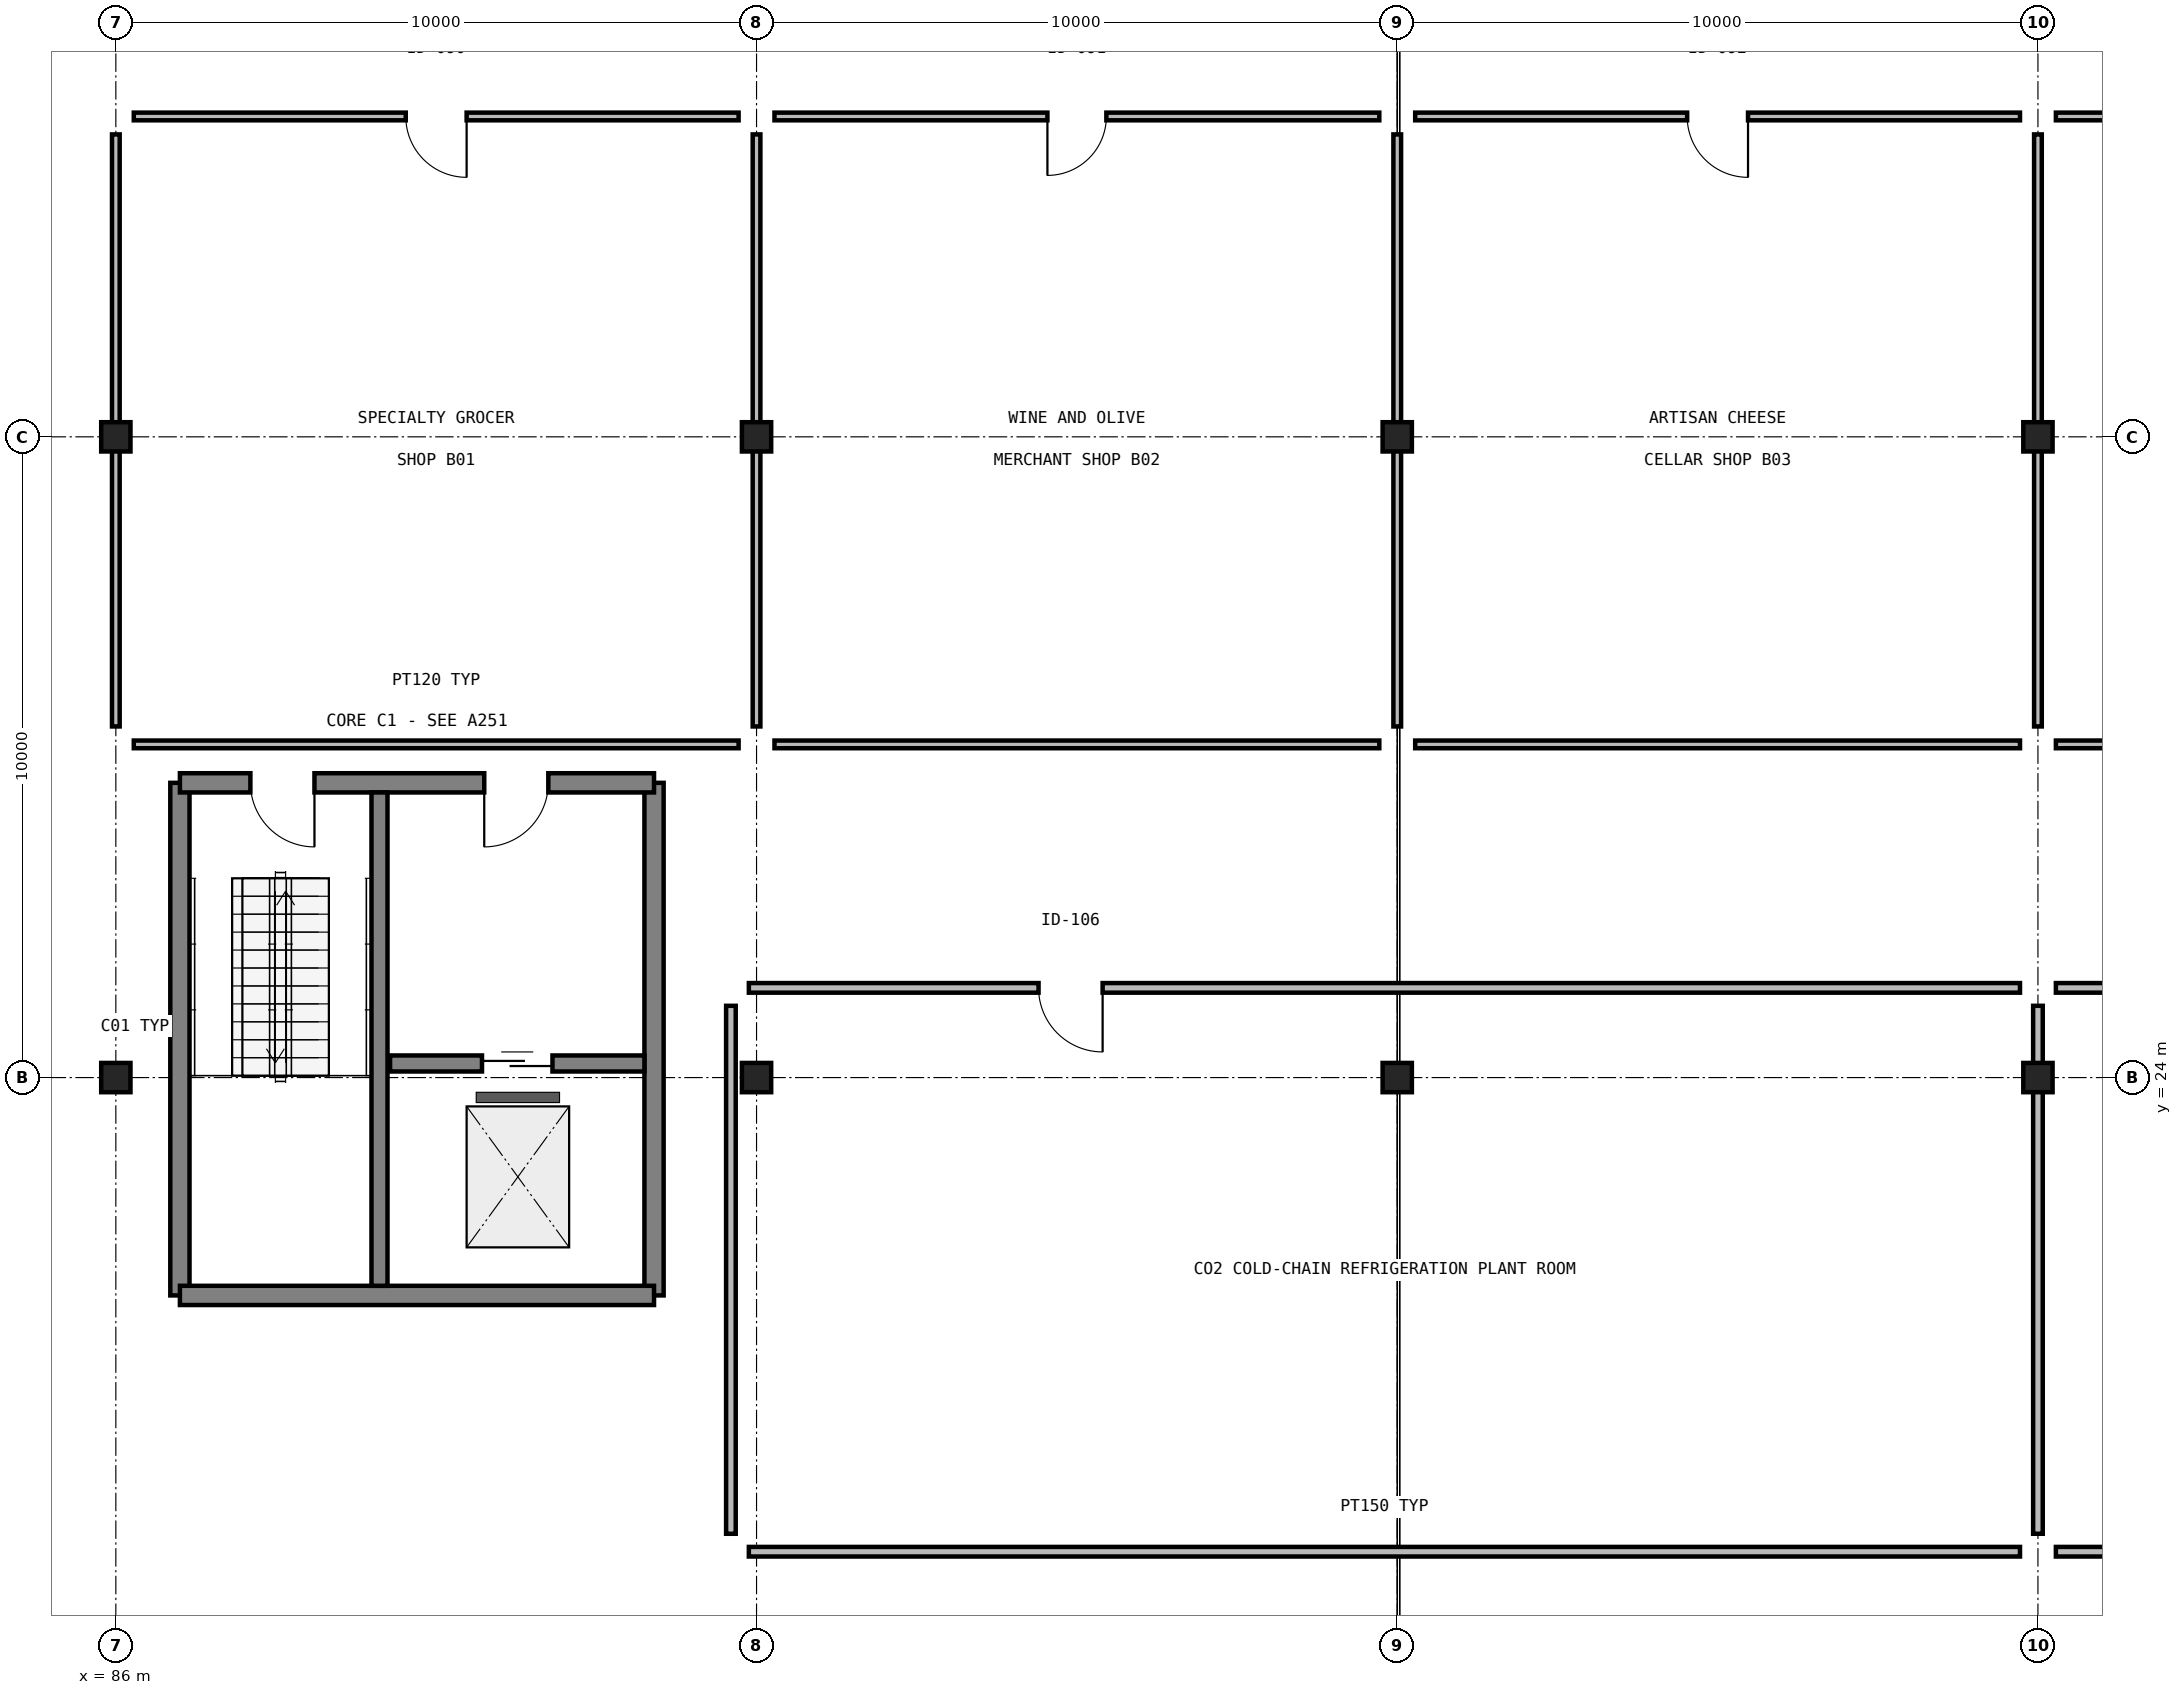
"""IFC4 building model, lengths in metres.
Left out: names, types, materials, properties, quantities, classifications, styles, units other than length and angle.
Written with IfcOpenShell. Run it as: python <this file> out.ifc"""

import sys

from ifc_helpers import new_model, si_unit, direction, frame, frame_2d, origin, origin_2d_with_axis, place, context, subcontext, project, spatial, rectangle, hollow_circle, extrude, element, fill, save


model = new_model("IFC4")
c1 = context("Model", 3, precision=1e-05, world=origin(), true_north=direction((0.0, 1.0)))
c2 = subcontext(c1, "Body", "Model", "MODEL_VIEW")
j1 = project(units=[si_unit("LENGTHUNIT", "METRE"), si_unit("PLANEANGLEUNIT", "RADIAN")], contexts=[c1])
p1 = place(None, origin())
s1 = spatial("IfcSite", under=j1, at=p1, CompositionType="ELEMENT")
p2 = place(p1, origin())
s2 = spatial("IfcBuilding", under=s1, at=p2, CompositionType="ELEMENT")
p3 = place(p2, frame((0.0, 0.0, -4.5)))
s3 = spatial("IfcBuildingStorey", under=s2, at=p3, CompositionType="ELEMENT", Elevation=-4.5)
for number, where, z_axis, x_axis in (
    (1, (86.0, 24.0, -0.45), (0.0, 0.0, 1.0), (1.0, 0.0, 0.0)),
    (2, (86.0, 34.0, -0.45), (0.0, 0.0, 1.0), (1.0, 0.0, 0.0)),
    (3, (96.0, 24.0, -0.45), (0.0, 0.0, 1.0), (1.0, 0.0, 0.0)),
    (4, (96.0, 34.0, -0.45), (0.0, 0.0, 1.0), (1.0, 0.0, 0.0)),
    (5, (106.0, 24.0, -0.45), (0.0, 0.0, 1.0), (1.0, 0.0, 0.0)),
    (6, (106.0, 34.0, -0.45), (0.0, 0.0, 1.0), (1.0, 0.0, 0.0)),
    (7, (116.0, 24.0, -0.45), (0.0, 0.0, 1.0), (1.0, 0.0, 0.0)),
    (8, (116.0, 34.0, -0.45), (0.0, 0.0, 1.0), (1.0, 0.0, 0.0)),
):
    element("IfcColumn", number, at=place(p3, frame(where, z_axis=z_axis, x_axis=x_axis)), inside=s3, PredefinedType="COLUMN", context=c2, shape_type="SweptSolid", body=[
        extrude(hollow_circle(Radius=0.229, WallThickness=0.013, at=origin_2d_with_axis()), origin(), (0.0, 0.0, 1.0), 4.95),
    ])
for number, where, z_axis, x_axis in (
    (9, (87.0, 28.6, 0.0), (0.0, 0.0, 1.0), (0.0, -1.0, 0.0)),
    (10, (94.4, 20.6, 0.0), (0.0, 0.0, 1.0), (0.0, 1.0, 0.0)),
):
    element("IfcWall", number, at=place(p3, frame(where, z_axis=z_axis, x_axis=x_axis)), inside=s3, PredefinedType="SHEAR", context=c2, shape_type="SweptSolid", body=[
        extrude(rectangle(XDim=8.0, YDim=0.3, at=frame_2d((4.0, 0.0), x_axis=(1.0, 0.0))), origin(), (0.0, 0.0, 1.0), 4.5),
    ])
p4 = place(p3, frame((87.0, 20.6, 0.0), z_axis=(0.0, 0.0, 1.0), x_axis=(1.0, 0.0, 0.0)))
e11 = element("IfcWall", 11, at=p4, inside=s3, PredefinedType="SHEAR", context=c2, shape_type="SweptSolid", body=[
    extrude(rectangle(XDim=7.4, YDim=0.3, at=frame_2d((3.7, 0.0), x_axis=(1.0, 0.0))), origin(), (0.0, 0.0, 1.0), 4.5),
])
p5 = place(p3, frame((94.4, 28.6, 0.0), z_axis=(0.0, 0.0, 1.0), x_axis=(-1.0, 0.0, 0.0)))
e12 = element("IfcWall", 12, at=p5, inside=s3, PredefinedType="SHEAR", context=c2, shape_type="SweptSolid", body=[
    extrude(rectangle(XDim=7.4, YDim=0.3, at=frame_2d((3.7, 0.0), x_axis=(1.0, 0.0))), origin(), (0.0, 0.0, 1.0), 4.5),
])
p6 = place(p5, frame((1.65, 0.0, 0.0)))
e13 = element("IfcOpeningElement", 13, at=p6, cuts=e12, PredefinedType="OPENING", context=c2, shape_type="SweptSolid", body=[
    extrude(rectangle(XDim=1.0, YDim=2.15, at=frame_2d((0.5, 1.075), x_axis=(1.0, 0.0))), frame((0.0, 0.16, 0.0), z_axis=(0.0, -1.0, 0.0), x_axis=(1.0, 0.0, 0.0)), (0.0, 0.0, 1.0), 0.32),
])
p7 = place(p5, frame((5.3, 0.0, 0.0)))
e14 = element("IfcOpeningElement", 14, at=p7, cuts=e12, PredefinedType="OPENING", context=c2, shape_type="SweptSolid", body=[
    extrude(rectangle(XDim=1.0, YDim=2.15, at=frame_2d((0.5, 1.075), x_axis=(1.0, 0.0))), frame((0.0, 0.16, 0.0), z_axis=(0.0, -1.0, 0.0), x_axis=(1.0, 0.0, 0.0)), (0.0, 0.0, 1.0), 0.32),
])
p8 = place(p3, frame((90.115, 20.75, 0.0), z_axis=(0.0, 0.0, 1.0), x_axis=(0.0, 1.0, 0.0)))
e15 = element("IfcWall", 15, at=p8, inside=s3, PredefinedType="SHEAR", context=c2, shape_type="SweptSolid", body=[
    extrude(rectangle(XDim=7.7, YDim=0.25, at=frame_2d((3.85, 0.0), x_axis=(1.0, 0.0))), origin(), (0.0, 0.0, 1.0), 4.5),
])
p9 = place(p3, frame((90.28, 24.22, 0.0), z_axis=(0.0, 0.0, 1.0), x_axis=(1.0, 0.0, 0.0)))
e16 = element("IfcWall", 16, at=p9, inside=s3, PredefinedType="SHEAR", context=c2, shape_type="SweptSolid", body=[
    extrude(rectangle(XDim=3.97, YDim=0.25, at=frame_2d((1.985, 0.0), x_axis=(1.0, 0.0))), origin(), (0.0, 0.0, 1.0), 4.2),
])
p10 = place(p9, frame((1.435, 0.0, 0.0)))
e17 = element("IfcOpeningElement", 17, at=p10, cuts=e16, PredefinedType="OPENING", context=c2, shape_type="SweptSolid", body=[
    extrude(rectangle(XDim=1.1, YDim=2.15, at=frame_2d((0.55, 1.075), x_axis=(1.0, 0.0))), frame((0.0, 0.135, 0.0), z_axis=(0.0, -1.0, 0.0), x_axis=(1.0, 0.0, 0.0)), (0.0, 0.0, 1.0), 0.27),
])
p11 = place(p3, frame((86.28, 29.2, 0.0), z_axis=(0.0, 0.0, 1.0), x_axis=(1.0, 0.0, 0.0)))
e18 = element("IfcWall", 18, at=p11, inside=s3, PredefinedType="PARTITIONING", context=c2, shape_type="SweptSolid", body=[
    extrude(rectangle(XDim=9.44, YDim=0.12, at=frame_2d((4.72, 0.0), x_axis=(1.0, 0.0))), origin(), (0.0, 0.0, 1.0), 3.58),
])
p12 = place(p3, frame((96.0, 29.48, 0.0), z_axis=(0.0, 0.0, 1.0), x_axis=(0.0, 1.0, 0.0)))
e19 = element("IfcWall", 19, at=p12, inside=s3, PredefinedType="PARTITIONING", context=c2, shape_type="SweptSolid", body=[
    extrude(rectangle(XDim=9.24, YDim=0.12, at=frame_2d((4.62, 0.0), x_axis=(1.0, 0.0))), origin(), (0.0, 0.0, 1.0), 3.58),
])
p13 = place(p3, frame((95.72, 39.0, 0.0), z_axis=(0.0, 0.0, 1.0), x_axis=(-1.0, 0.0, 0.0)))
e20 = element("IfcWall", 20, at=p13, inside=s3, PredefinedType="PARTITIONING", context=c2, shape_type="SweptSolid", body=[
    extrude(rectangle(XDim=9.44, YDim=0.12, at=frame_2d((4.72, 0.0), x_axis=(1.0, 0.0))), origin(), (0.0, 0.0, 1.0), 3.58),
])
p14 = place(p13, frame((4.245, 0.0, 0.0)))
e21 = element("IfcOpeningElement", 21, at=p14, cuts=e20, PredefinedType="OPENING", context=c2, shape_type="SweptSolid", body=[
    extrude(rectangle(XDim=0.95, YDim=2.15, at=frame_2d((0.475, 1.075), x_axis=(1.0, 0.0))), frame((0.0, 0.07, 0.0), z_axis=(0.0, -1.0, 0.0), x_axis=(1.0, 0.0, 0.0)), (0.0, 0.0, 1.0), 0.14),
])
p15 = place(p3, frame((86.0, 38.72, 0.0), z_axis=(0.0, 0.0, 1.0), x_axis=(0.0, -1.0, 0.0)))
e22 = element("IfcWall", 22, at=p15, inside=s3, PredefinedType="PARTITIONING", context=c2, shape_type="SweptSolid", body=[
    extrude(rectangle(XDim=9.24, YDim=0.12, at=frame_2d((4.62, 0.0), x_axis=(1.0, 0.0))), origin(), (0.0, 0.0, 1.0), 3.58),
])
p16 = place(p3, frame((96.28, 29.2, 0.0), z_axis=(0.0, 0.0, 1.0), x_axis=(1.0, 0.0, 0.0)))
e23 = element("IfcWall", 23, at=p16, inside=s3, PredefinedType="PARTITIONING", context=c2, shape_type="SweptSolid", body=[
    extrude(rectangle(XDim=9.44, YDim=0.12, at=frame_2d((4.72, 0.0), x_axis=(1.0, 0.0))), origin(), (0.0, 0.0, 1.0), 3.58),
])
p17 = place(p3, frame((106.0, 29.48, 0.0), z_axis=(0.0, 0.0, 1.0), x_axis=(0.0, 1.0, 0.0)))
e24 = element("IfcWall", 24, at=p17, inside=s3, PredefinedType="PARTITIONING", context=c2, shape_type="SweptSolid", body=[
    extrude(rectangle(XDim=9.24, YDim=0.12, at=frame_2d((4.62, 0.0), x_axis=(1.0, 0.0))), origin(), (0.0, 0.0, 1.0), 3.58),
])
p18 = place(p3, frame((105.72, 39.0, 0.0), z_axis=(0.0, 0.0, 1.0), x_axis=(-1.0, 0.0, 0.0)))
e25 = element("IfcWall", 25, at=p18, inside=s3, PredefinedType="PARTITIONING", context=c2, shape_type="SweptSolid", body=[
    extrude(rectangle(XDim=9.44, YDim=0.12, at=frame_2d((4.72, 0.0), x_axis=(1.0, 0.0))), origin(), (0.0, 0.0, 1.0), 3.58),
])
p19 = place(p18, frame((4.26, 0.0, 0.0)))
e26 = element("IfcOpeningElement", 26, at=p19, cuts=e25, PredefinedType="OPENING", context=c2, shape_type="SweptSolid", body=[
    extrude(rectangle(XDim=0.92, YDim=2.15, at=frame_2d((0.46, 1.075), x_axis=(1.0, 0.0))), frame((0.0, 0.07, 0.0), z_axis=(0.0, -1.0, 0.0), x_axis=(1.0, 0.0, 0.0)), (0.0, 0.0, 1.0), 0.14),
])
p20 = place(p3, frame((106.28, 29.2, 0.0), z_axis=(0.0, 0.0, 1.0), x_axis=(1.0, 0.0, 0.0)))
e27 = element("IfcWall", 27, at=p20, inside=s3, PredefinedType="PARTITIONING", context=c2, shape_type="SweptSolid", body=[
    extrude(rectangle(XDim=9.44, YDim=0.12, at=frame_2d((4.72, 0.0), x_axis=(1.0, 0.0))), origin(), (0.0, 0.0, 1.0), 3.58),
])
p21 = place(p3, frame((116.0, 29.48, 0.0), z_axis=(0.0, 0.0, 1.0), x_axis=(0.0, 1.0, 0.0)))
e28 = element("IfcWall", 28, at=p21, inside=s3, PredefinedType="PARTITIONING", context=c2, shape_type="SweptSolid", body=[
    extrude(rectangle(XDim=9.24, YDim=0.12, at=frame_2d((4.62, 0.0), x_axis=(1.0, 0.0))), origin(), (0.0, 0.0, 1.0), 3.58),
])
p22 = place(p3, frame((115.72, 39.0, 0.0), z_axis=(0.0, 0.0, 1.0), x_axis=(-1.0, 0.0, 0.0)))
e29 = element("IfcWall", 29, at=p22, inside=s3, PredefinedType="PARTITIONING", context=c2, shape_type="SweptSolid", body=[
    extrude(rectangle(XDim=9.44, YDim=0.12, at=frame_2d((4.72, 0.0), x_axis=(1.0, 0.0))), origin(), (0.0, 0.0, 1.0), 3.58),
])
p23 = place(p22, frame((4.245, 0.0, 0.0)))
e30 = element("IfcOpeningElement", 30, at=p23, cuts=e29, PredefinedType="OPENING", context=c2, shape_type="SweptSolid", body=[
    extrude(rectangle(XDim=0.95, YDim=2.15, at=frame_2d((0.475, 1.075), x_axis=(1.0, 0.0))), frame((0.0, 0.07, 0.0), z_axis=(0.0, -1.0, 0.0), x_axis=(1.0, 0.0, 0.0)), (0.0, 0.0, 1.0), 0.14),
])
p24 = place(p3, frame((116.28, 29.2, 0.0), z_axis=(0.0, 0.0, 1.0), x_axis=(1.0, 0.0, 0.0)))
e31 = element("IfcWall", 31, at=p24, inside=s3, PredefinedType="PARTITIONING", context=c2, shape_type="SweptSolid", body=[
    extrude(rectangle(XDim=9.44, YDim=0.12, at=frame_2d((4.72, 0.0), x_axis=(1.0, 0.0))), origin(), (0.0, 0.0, 1.0), 3.58),
])
p25 = place(p3, frame((125.72, 39.0, 0.0), z_axis=(0.0, 0.0, 1.0), x_axis=(-1.0, 0.0, 0.0)))
e32 = element("IfcWall", 32, at=p25, inside=s3, PredefinedType="PARTITIONING", context=c2, shape_type="SweptSolid", body=[
    extrude(rectangle(XDim=9.44, YDim=0.12, at=frame_2d((4.72, 0.0), x_axis=(1.0, 0.0))), origin(), (0.0, 0.0, 1.0), 3.58),
])
p26 = place(p25, frame((4.26, 0.0, 0.0)))
e33 = element("IfcOpeningElement", 33, at=p26, cuts=e32, PredefinedType="OPENING", context=c2, shape_type="SweptSolid", body=[
    extrude(rectangle(XDim=0.92, YDim=2.15, at=frame_2d((0.46, 1.075), x_axis=(1.0, 0.0))), frame((0.0, 0.07, 0.0), z_axis=(0.0, -1.0, 0.0), x_axis=(1.0, 0.0, 0.0)), (0.0, 0.0, 1.0), 0.14),
])
p27 = place(p3, frame((95.88, 16.6, 0.0), z_axis=(0.0, 0.0, 1.0), x_axis=(1.0, 0.0, 0.0)))
e34 = element("IfcWall", 34, at=p27, inside=s3, PredefinedType="PARTITIONING", context=c2, shape_type="SweptSolid", body=[
    extrude(rectangle(XDim=19.84, YDim=0.15, at=frame_2d((9.92, 0.0), x_axis=(1.0, 0.0))), origin(), (0.0, 0.0, 1.0), 3.58),
])
p28 = place(p3, frame((116.0, 16.88, 0.0), z_axis=(0.0, 0.0, 1.0), x_axis=(0.0, 1.0, 0.0)))
e35 = element("IfcWall", 35, at=p28, inside=s3, PredefinedType="PARTITIONING", context=c2, shape_type="SweptSolid", body=[
    extrude(rectangle(XDim=8.24, YDim=0.15, at=frame_2d((4.12, 0.0), x_axis=(1.0, 0.0))), origin(), (0.0, 0.0, 1.0), 3.58),
])
p29 = place(p3, frame((115.72, 25.4, 0.0), z_axis=(0.0, 0.0, 1.0), x_axis=(-1.0, 0.0, 0.0)))
e36 = element("IfcWall", 36, at=p29, inside=s3, PredefinedType="PARTITIONING", context=c2, shape_type="SweptSolid", body=[
    extrude(rectangle(XDim=19.84, YDim=0.15, at=frame_2d((9.92, 0.0), x_axis=(1.0, 0.0))), origin(), (0.0, 0.0, 1.0), 3.58),
])
p30 = place(p29, frame((14.318, 0.0, 0.0)))
e37 = element("IfcOpeningElement", 37, at=p30, cuts=e36, PredefinedType="OPENING", context=c2, shape_type="SweptSolid", body=[
    extrude(rectangle(XDim=1.0, YDim=2.15, at=frame_2d((0.5, 1.075), x_axis=(1.0, 0.0))), frame((0.0, 0.085, 0.0), z_axis=(0.0, -1.0, 0.0), x_axis=(1.0, 0.0, 0.0)), (0.0, 0.0, 1.0), 0.17),
])
p31 = place(p3, frame((95.6, 25.12, 0.0), z_axis=(0.0, 0.0, 1.0), x_axis=(0.0, -1.0, 0.0)))
e38 = element("IfcWall", 38, at=p31, inside=s3, PredefinedType="PARTITIONING", context=c2, shape_type="SweptSolid", body=[
    extrude(rectangle(XDim=8.24, YDim=0.15, at=frame_2d((4.12, 0.0), x_axis=(1.0, 0.0))), origin(), (0.0, 0.0, 1.0), 3.58),
])
p32 = place(p3, frame((116.28, 16.6, 0.0), z_axis=(0.0, 0.0, 1.0), x_axis=(1.0, 0.0, 0.0)))
e39 = element("IfcWall", 39, at=p32, inside=s3, PredefinedType="PARTITIONING", context=c2, shape_type="SweptSolid", body=[
    extrude(rectangle(XDim=19.84, YDim=0.15, at=frame_2d((9.92, 0.0), x_axis=(1.0, 0.0))), origin(), (0.0, 0.0, 1.0), 3.58),
])
p33 = place(p3, frame((136.12, 25.4, 0.0), z_axis=(0.0, 0.0, 1.0), x_axis=(-1.0, 0.0, 0.0)))
e40 = element("IfcWall", 40, at=p33, inside=s3, PredefinedType="PARTITIONING", context=c2, shape_type="SweptSolid", body=[
    extrude(rectangle(XDim=19.84, YDim=0.15, at=frame_2d((9.92, 0.0), x_axis=(1.0, 0.0))), origin(), (0.0, 0.0, 1.0), 3.58),
])
p34 = place(p33, frame((4.521, 0.0, 0.0)))
e41 = element("IfcOpeningElement", 41, at=p34, cuts=e40, PredefinedType="OPENING", context=c2, shape_type="SweptSolid", body=[
    extrude(rectangle(XDim=1.0, YDim=2.15, at=frame_2d((0.5, 1.075), x_axis=(1.0, 0.0))), frame((0.0, 0.085, 0.0), z_axis=(0.0, -1.0, 0.0), x_axis=(1.0, 0.0, 0.0)), (0.0, 0.0, 1.0), 0.17),
])
p35 = place(p6, origin())
e42 = element("IfcDoor", 42, at=p35, inside=s3, OperationType="SINGLE_SWING_RIGHT", PredefinedType="DOOR", context=c2, shape_type="SweptSolid", body=[
    extrude(rectangle(XDim=1.0, YDim=2.15, at=frame_2d((0.5, 1.075), x_axis=(1.0, 0.0))), frame((0.0, 0.025, 0.0), z_axis=(0.0, -1.0, 0.0), x_axis=(1.0, 0.0, 0.0)), (0.0, 0.0, 1.0), 0.05),
])
fill(e13, e42)
p36 = place(p7, origin())
e43 = element("IfcDoor", 43, at=p36, inside=s3, OperationType="SINGLE_SWING_LEFT", PredefinedType="DOOR", context=c2, shape_type="SweptSolid", body=[
    extrude(rectangle(XDim=1.0, YDim=2.15, at=frame_2d((0.5, 1.075), x_axis=(1.0, 0.0))), frame((0.0, 0.025, 0.0), z_axis=(0.0, -1.0, 0.0), x_axis=(1.0, 0.0, 0.0)), (0.0, 0.0, 1.0), 0.05),
])
fill(e14, e43)
p37 = place(p10, origin())
e44 = element("IfcDoor", 44, at=p37, inside=s3, OperationType="SLIDING_TO_LEFT", PredefinedType="DOOR", context=c2, shape_type="SweptSolid", body=[
    extrude(rectangle(XDim=1.1, YDim=2.15, at=frame_2d((0.55, 1.075), x_axis=(1.0, 0.0))), frame((0.0, 0.025, 0.0), z_axis=(0.0, -1.0, 0.0), x_axis=(1.0, 0.0, 0.0)), (0.0, 0.0, 1.0), 0.05),
])
fill(e17, e44)
p38 = place(p14, origin())
e45 = element("IfcDoor", 45, at=p38, inside=s3, OperationType="SINGLE_SWING_LEFT", PredefinedType="DOOR", context=c2, shape_type="SweptSolid", body=[
    extrude(rectangle(XDim=0.95, YDim=2.15, at=frame_2d((0.475, 1.075), x_axis=(1.0, 0.0))), frame((0.0, 0.025, 0.0), z_axis=(0.0, -1.0, 0.0), x_axis=(1.0, 0.0, 0.0)), (0.0, 0.0, 1.0), 0.05),
])
fill(e21, e45)
p39 = place(p19, origin())
e46 = element("IfcDoor", 46, at=p39, inside=s3, OperationType="SINGLE_SWING_RIGHT", PredefinedType="DOOR", context=c2, shape_type="SweptSolid", body=[
    extrude(rectangle(XDim=0.92, YDim=2.15, at=frame_2d((0.46, 1.075), x_axis=(1.0, 0.0))), frame((0.0, 0.025, 0.0), z_axis=(0.0, -1.0, 0.0), x_axis=(1.0, 0.0, 0.0)), (0.0, 0.0, 1.0), 0.05),
])
fill(e26, e46)
p40 = place(p23, origin())
e47 = element("IfcDoor", 47, at=p40, inside=s3, OperationType="SINGLE_SWING_LEFT", PredefinedType="DOOR", context=c2, shape_type="SweptSolid", body=[
    extrude(rectangle(XDim=0.95, YDim=2.15, at=frame_2d((0.475, 1.075), x_axis=(1.0, 0.0))), frame((0.0, 0.025, 0.0), z_axis=(0.0, -1.0, 0.0), x_axis=(1.0, 0.0, 0.0)), (0.0, 0.0, 1.0), 0.05),
])
fill(e30, e47)
p41 = place(p30, origin())
e48 = element("IfcDoor", 48, at=p41, inside=s3, OperationType="SINGLE_SWING_LEFT", PredefinedType="DOOR", context=c2, shape_type="SweptSolid", body=[
    extrude(rectangle(XDim=1.0, YDim=2.15, at=frame_2d((0.5, 1.075), x_axis=(1.0, 0.0))), frame((0.0, 0.025, 0.0), z_axis=(0.0, -1.0, 0.0), x_axis=(1.0, 0.0, 0.0)), (0.0, 0.0, 1.0), 0.05),
])
fill(e37, e48)
save(model, sys.argv[1])
